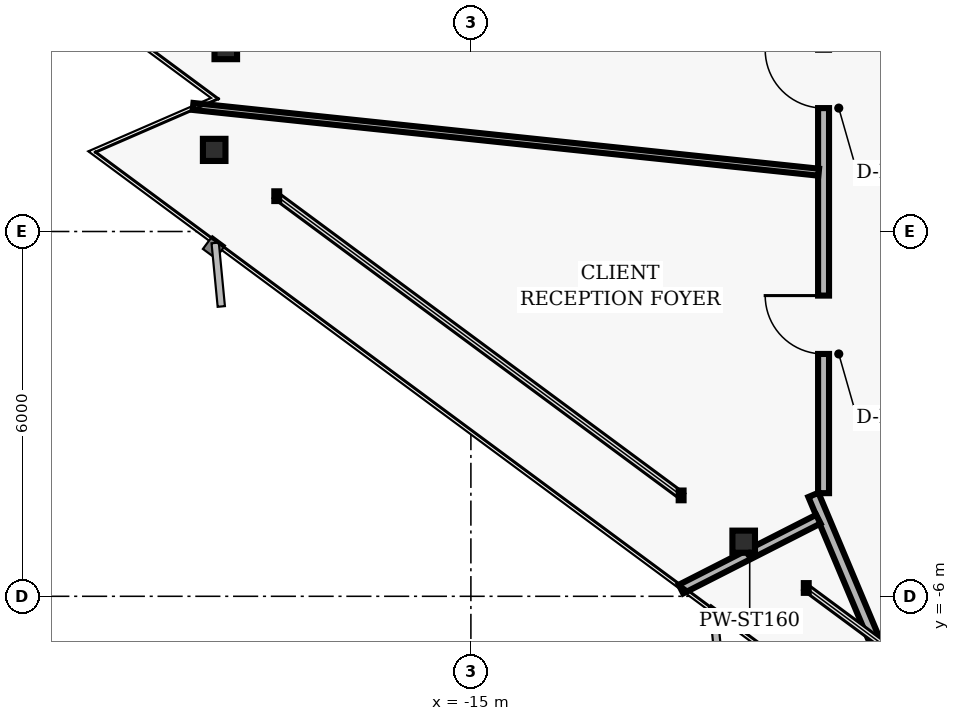
"""IFC4 building model, lengths in metres.
Left out: names, types, materials, properties, quantities, classifications, styles, units other than length and angle.
Written with IfcOpenShell. Run it as: python <this file> out.ifc"""

import sys

from ifc_helpers import new_model, si_unit, direction, frame, frame_2d, origin, origin_2d, place, context, subcontext, project, spatial, rectangle, i_section, extrude, element, fill, save


model = new_model("IFC4")
c1 = context("Model", 3, precision=1e-05, world=origin(), true_north=direction((0.0, 1.0)))
c2 = subcontext(c1, "Body", "Model", "MODEL_VIEW")
j1 = project(units=[si_unit("LENGTHUNIT", "METRE"), si_unit("PLANEANGLEUNIT", "RADIAN")], contexts=[c1])
p1 = place(None, origin())
s1 = spatial("IfcSite", under=j1, at=p1, CompositionType="ELEMENT")
p2 = place(p1, origin())
s2 = spatial("IfcBuilding", under=s1, at=p2, CompositionType="ELEMENT")
p3 = place(p2, frame((0.0, 0.0, 230.08)))
s3 = spatial("IfcBuildingStorey", under=s2, at=p3, CompositionType="ELEMENT", Elevation=230.08)
for number, where, z_axis, x_axis in (
    (1, (-19.031, 3.016, 0.0), (0.0, 0.0, 1.0), (1.0, 0.0, 0.0)),
    (2, (-19.222, 1.342, 0.0), (0.0, 0.0, 1.0), (1.0, 0.0, 0.0)),
    (3, (-10.513, -5.102, 0.0), (0.0, 0.0, 1.0), (1.0, 0.0, 0.0)),
):
    element("IfcColumn", number, at=place(p3, frame(where, z_axis=z_axis, x_axis=x_axis)), inside=s3, PredefinedType="COLUMN", context=c2, shape_type="SweptSolid", body=[
        extrude(i_section(OverallWidth=0.371, OverallDepth=0.364, WebThickness=0.013, FlangeThickness=0.022, FilletRadius=0.015, at=origin_2d()), origin(), (0.0, 0.0, 1.0), 3.04),
    ])
p4 = place(p3, frame((-7.574, -8.596, 0.0), z_axis=(0.0, 0.0, 1.0), x_axis=(-0.38757793583, 0.921836939842, 0.0)))
e4 = element("IfcWall", 4, at=p4, inside=s3, PredefinedType="PARTITIONING", context=c2, shape_type="SweptSolid", body=[
    extrude(rectangle(XDim=4.625, YDim=0.18, at=frame_2d((2.313, 0.0))), origin(), (0.0, 0.0, 1.0), 2.773),
])
p5 = place(p3, frame((-9.2, -4.303, 0.0), z_axis=(0.0, 0.0, 1.0), x_axis=(0.0, 1.0, 0.0)))
e5 = element("IfcWall", 5, at=p5, inside=s3, PredefinedType="PARTITIONING", context=c2, shape_type="SweptSolid", body=[
    extrude(rectangle(XDim=8.607, YDim=0.18, at=frame_2d((4.303, 0.0))), origin(), (0.0, 0.0, 1.0), 2.773),
])
p6 = place(p5, frame((2.289, 0.0, 0.0)))
e6 = element("IfcOpeningElement", 6, at=p6, cuts=e5, PredefinedType="OPENING", context=c2, shape_type="SweptSolid", body=[
    extrude(rectangle(XDim=0.96, YDim=2.02, at=frame_2d((0.48, 1.01))), frame((0.0, 0.1, 0.0), z_axis=(0.0, -1.0, 0.0), x_axis=(1.0, 0.0, 0.0)), (0.0, 0.0, 1.0), 0.2),
])
p7 = place(p5, frame((6.333, 0.0, 0.0)))
e7 = element("IfcOpeningElement", 7, at=p7, cuts=e5, PredefinedType="OPENING", context=c2, shape_type="SweptSolid", body=[
    extrude(rectangle(XDim=0.96, YDim=2.02, at=frame_2d((0.48, 1.01))), frame((0.0, 0.1, 0.0), z_axis=(0.0, -1.0, 0.0), x_axis=(1.0, 0.0, 0.0)), (0.0, 0.0, 1.0), 0.2),
])
p8 = place(p3, frame((-9.286, -4.731, 0.0), z_axis=(0.0, 0.0, 1.0), x_axis=(-0.890990970919, -0.454021023456, 0.0)))
e8 = element("IfcWall", 8, at=p8, inside=s3, PredefinedType="PARTITIONING", context=c2, shape_type="SweptSolid", body=[
    extrude(rectangle(XDim=2.534, YDim=0.16, at=frame_2d((1.267, 0.0))), origin(), (0.0, 0.0, 1.0), 2.773),
])
p9 = place(p3, frame((-9.28, 0.975, 0.0), z_axis=(0.0, 0.0, 1.0), x_axis=(-0.994520958229, 0.104537379166, 0.0)))
e9 = element("IfcWall", 9, at=p9, inside=s3, PredefinedType="MOVABLE", context=c2, shape_type="SweptSolid", body=[
    extrude(rectangle(XDim=10.346, YDim=0.115, at=frame_2d((5.173, 0.0))), origin(), (0.0, 0.0, 1.0), 2.773),
])
p10 = place(p6, origin())
e10 = element("IfcDoor", 10, at=p10, inside=s3, OperationType="SINGLE_SWING_RIGHT", PredefinedType="DOOR", context=c2, shape_type="SweptSolid", body=[
    extrude(rectangle(XDim=0.96, YDim=2.02, at=frame_2d((0.48, 1.01))), frame((0.0, 0.025, 0.0), z_axis=(0.0, -1.0, 0.0), x_axis=(1.0, 0.0, 0.0)), (0.0, 0.0, 1.0), 0.05),
])
fill(e6, e10)
p11 = place(p7, origin())
e11 = element("IfcDoor", 11, at=p11, inside=s3, OperationType="SINGLE_SWING_RIGHT", PredefinedType="DOOR", context=c2, shape_type="SweptSolid", body=[
    extrude(rectangle(XDim=0.96, YDim=2.02, at=frame_2d((0.48, 1.01))), frame((0.0, 0.025, 0.0), z_axis=(0.0, -1.0, 0.0), x_axis=(1.0, 0.0, 0.0)), (0.0, 0.0, 1.0), 0.05),
])
fill(e7, e11)
save(model, sys.argv[1])
